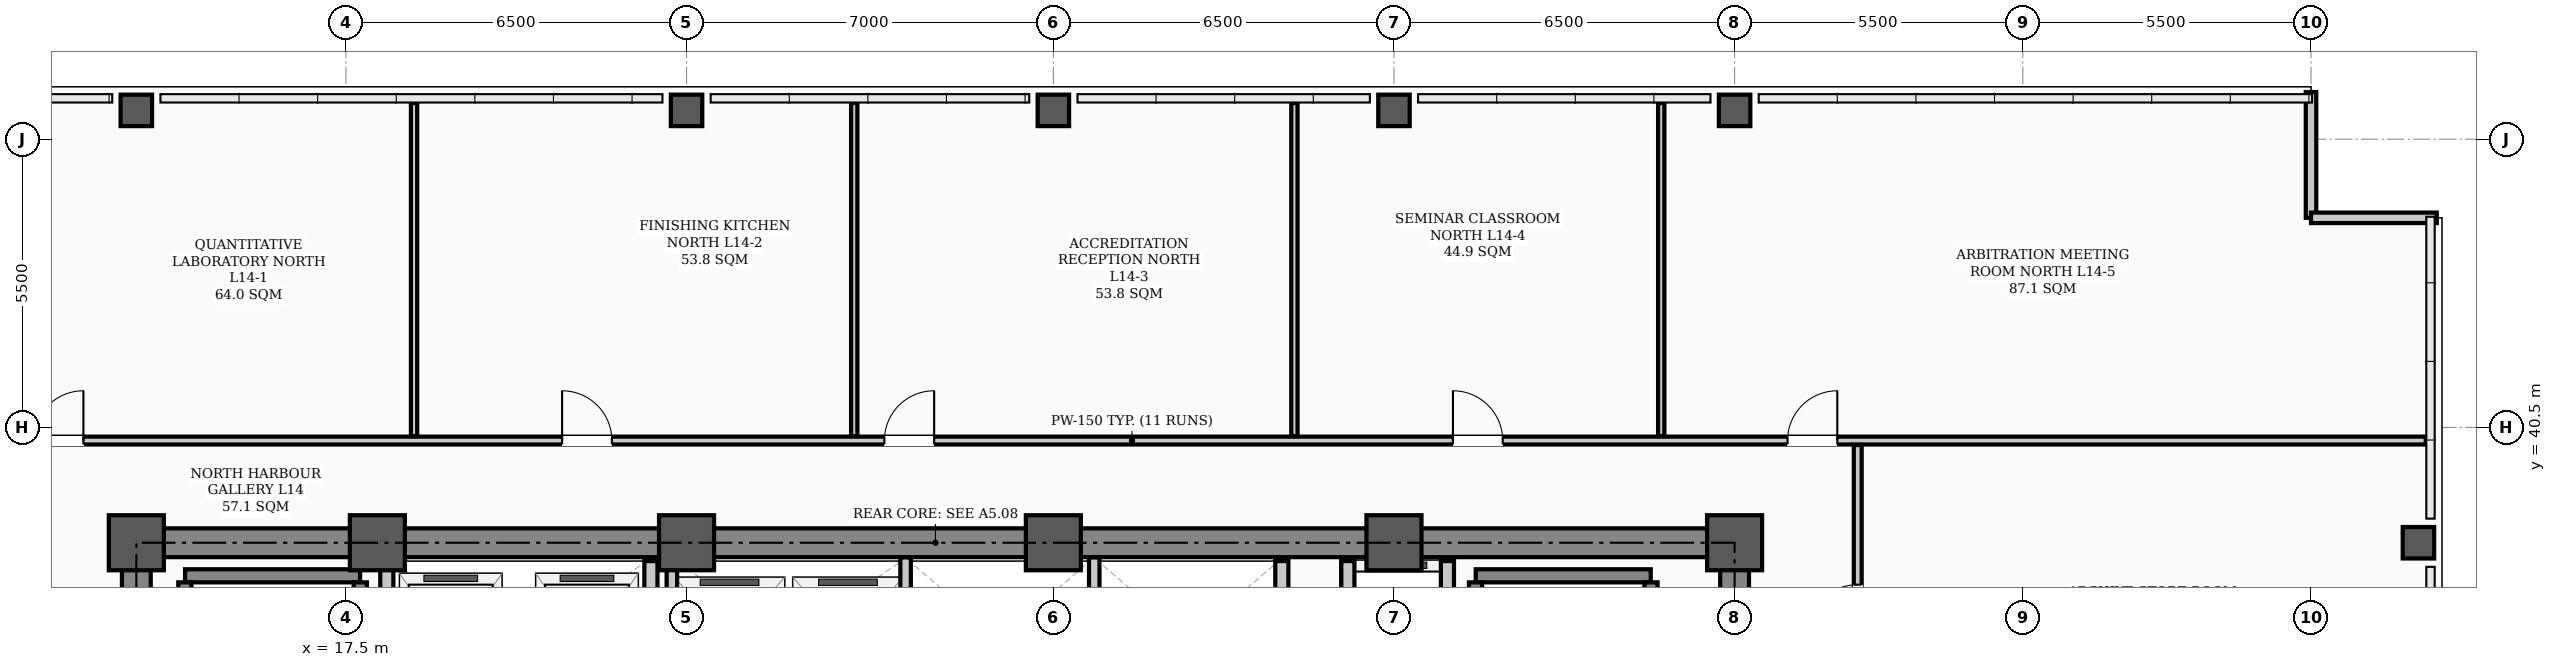
"""IFC4 building model, lengths in metres.
Left out: names, types, materials, properties, quantities, classifications, styles, units other than length and angle.
Written with IfcOpenShell. Run it as: python <this file> out.ifc"""

import sys

from ifc_helpers import new_model, si_unit, direction, frame, frame_2d, origin, origin_2d, place, context, subcontext, project, spatial, rectangle, hollow_rectangle, extrude, element, fill, save


model = new_model("IFC4")
c1 = context("Model", 3, precision=1e-05, world=origin(), true_north=direction((0.0, 1.0)))
c2 = subcontext(c1, "Body", "Model", "MODEL_VIEW")
j1 = project(units=[si_unit("LENGTHUNIT", "METRE"), si_unit("PLANEANGLEUNIT", "RADIAN")], contexts=[c1])
p1 = place(None, origin())
s1 = spatial("IfcSite", under=j1, at=p1, CompositionType="ELEMENT")
p2 = place(p1, origin())
s2 = spatial("IfcBuilding", under=s1, at=p2, CompositionType="ELEMENT")
p3 = place(p2, frame((0.0, 0.0, 57.7)))
s3 = spatial("IfcBuildingStorey", under=s2, at=p3, CompositionType="ELEMENT", Elevation=57.7)
for number, where, z_axis, x_axis in (
    (1, (13.5, 38.3, 0.0), (0.0, 0.0, 1.0), (1.0, 0.0, 0.0)),
    (2, (18.1, 38.3, 0.0), (0.0, 0.0, 1.0), (1.0, 0.0, 0.0)),
    (3, (24.0, 38.3, 0.0), (0.0, 0.0, 1.0), (1.0, 0.0, 0.0)),
    (4, (31.0, 38.3, 0.0), (0.0, 0.0, 1.0), (1.0, 0.0, 0.0)),
    (5, (37.5, 38.3, 0.0), (0.0, 0.0, 1.0), (1.0, 0.0, 0.0)),
    (6, (44.0, 38.3, 0.0), (0.0, 0.0, 1.0), (1.0, 0.0, 0.0)),
):
    element("IfcColumn", number, at=place(p3, frame(where, z_axis=z_axis, x_axis=x_axis)), inside=s3, PredefinedType="COLUMN", context=c2, shape_type="SweptSolid", body=[
        extrude(hollow_rectangle(XDim=1.05, YDim=1.05, WallThickness=0.038, InnerFilletRadius=0.019, OuterFilletRadius=0.057, at=origin_2d()), origin(), (0.0, 0.0, 1.0), 3.9),
    ])
for number, where, z_axis, x_axis in (
    (7, (13.5, 46.55, 0.0), (0.0, 0.0, 1.0), (1.0, 0.0, 0.0)),
    (8, (24.0, 46.55, 0.0), (0.0, 0.0, 1.0), (1.0, 0.0, 0.0)),
    (9, (31.0, 46.55, 0.0), (0.0, 0.0, 1.0), (1.0, 0.0, 0.0)),
    (10, (37.5, 46.55, 0.0), (0.0, 0.0, 1.0), (1.0, 0.0, 0.0)),
    (11, (44.0, 46.55, 0.0), (0.0, 0.0, 1.0), (1.0, 0.0, 0.0)),
    (12, (57.05, 38.3, 0.0), (0.0, 0.0, 1.0), (1.0, 0.0, 0.0)),
):
    element("IfcColumn", number, at=place(p3, frame(where, z_axis=z_axis, x_axis=x_axis)), inside=s3, PredefinedType="COLUMN", context=c2, shape_type="SweptSolid", body=[
        extrude(hollow_rectangle(XDim=0.6, YDim=0.6, WallThickness=0.026, InnerFilletRadius=0.013, OuterFilletRadius=0.039, at=origin_2d()), origin(), (0.0, 0.0, 1.0), 3.9),
    ])
for number, where, z_axis, x_axis in (
    (13, (55.0, 46.9, 0.0), (0.0, 0.0, 1.0), (0.0, -1.0, 0.0)),
    (14, (55.0, 44.5, 0.0), (0.0, 0.0, 1.0), (1.0, 0.0, 0.0)),
):
    element("IfcWall", number, at=place(p3, frame(where, z_axis=z_axis, x_axis=x_axis)), inside=s3, PredefinedType="PARAPET", context=c2, shape_type="SweptSolid", body=[
        extrude(rectangle(XDim=2.4, YDim=0.2, at=frame_2d((1.2, 0.0))), origin(), (0.0, 0.0, 1.0), 1.2),
    ])
p4 = place(p3, frame((13.5, 38.3, 0.0), z_axis=(0.0, 0.0, 1.0), x_axis=(1.0, 0.0, 0.0)))
e15 = element("IfcWall", 15, at=p4, inside=s3, PredefinedType="SHEAR", context=c2, shape_type="SweptSolid", body=[
    extrude(rectangle(XDim=30.5, YDim=0.55, at=frame_2d((15.25, 0.0))), origin(), (0.0, 0.0, 1.0), 3.72),
])
for number, where, z_axis, x_axis in (
    (16, (13.5, 29.35, 0.0), (0.0, 0.0, 1.0), (0.0, 1.0, 0.0)),
    (17, (44.0, 29.35, 0.0), (0.0, 0.0, 1.0), (0.0, 1.0, 0.0)),
):
    element("IfcWall", number, at=place(p3, frame(where, z_axis=z_axis, x_axis=x_axis)), inside=s3, PredefinedType="SHEAR", context=c2, shape_type="SweptSolid", body=[
        extrude(rectangle(XDim=8.6, YDim=0.55, at=frame_2d((4.3, 0.0))), origin(), (0.0, 0.0, 1.0), 3.72),
    ])
p5 = place(p3, frame((14.43, 37.669, 0.0), z_axis=(0.0, 0.0, 1.0), x_axis=(1.0, 0.0, 0.0)))
e18 = element("IfcWall", 18, at=p5, inside=s3, PredefinedType="STANDARD", context=c2, shape_type="SweptSolid", body=[
    extrude(rectangle(XDim=3.34, YDim=0.25, at=frame_2d((1.67, 0.0))), origin(), (0.0, 0.0, 1.0), 3.72),
])
for number, where, z_axis, x_axis in (
    (19, (14.425, 30.36, 0.0), (0.0, 0.0, 1.0), (0.0, 1.0, 0.0)),
    (20, (17.775, 30.36, 0.0), (0.0, 0.0, 1.0), (0.0, 1.0, 0.0)),
):
    element("IfcWall", number, at=place(p3, frame(where, z_axis=z_axis, x_axis=x_axis)), inside=s3, PredefinedType="STANDARD", context=c2, shape_type="SweptSolid", body=[
        extrude(rectangle(XDim=7.184, YDim=0.25, at=frame_2d((3.592, 0.0))), origin(), (0.0, 0.0, 1.0), 3.72),
    ])
p6 = place(p3, frame((39.06, 37.669, 0.0), z_axis=(0.0, 0.0, 1.0), x_axis=(1.0, 0.0, 0.0)))
e21 = element("IfcWall", 21, at=p6, inside=s3, PredefinedType="STANDARD", context=c2, shape_type="SweptSolid", body=[
    extrude(rectangle(XDim=3.34, YDim=0.25, at=frame_2d((1.67, 0.0))), origin(), (0.0, 0.0, 1.0), 3.72),
])
for number, where, z_axis, x_axis in (
    (22, (39.055, 30.36, 0.0), (0.0, 0.0, 1.0), (0.0, 1.0, 0.0)),
    (23, (42.405, 30.36, 0.0), (0.0, 0.0, 1.0), (0.0, 1.0, 0.0)),
):
    element("IfcWall", number, at=place(p3, frame(where, z_axis=z_axis, x_axis=x_axis)), inside=s3, PredefinedType="STANDARD", context=c2, shape_type="SweptSolid", body=[
        extrude(rectangle(XDim=7.184, YDim=0.25, at=frame_2d((3.592, 0.0))), origin(), (0.0, 0.0, 1.0), 3.72),
    ])
p7 = place(p3, frame((36.62, 31.95, 0.0), z_axis=(0.0, 0.0, 1.0), x_axis=(0.0, 1.0, 0.0)))
e24 = element("IfcWall", 24, at=p7, inside=s3, PredefinedType="STANDARD", context=c2, shape_type="SweptSolid", body=[
    extrude(rectangle(XDim=6.0, YDim=0.25, at=frame_2d((3.0, 0.0))), origin(), (0.0, 0.0, 1.0), 3.3),
])
p8 = place(p7, frame((0.9, 0.0, 0.0)))
e25 = element("IfcOpeningElement", 25, at=p8, cuts=e24, PredefinedType="OPENING", context=c2, shape_type="SweptSolid", body=[
    extrude(rectangle(XDim=1.1, YDim=2.08, at=frame_2d((0.55, 1.04))), frame((0.0, 0.135, 0.0), z_axis=(0.0, -1.0, 0.0), x_axis=(1.0, 0.0, 0.0)), (0.0, 0.0, 1.0), 0.27),
])
p9 = place(p7, frame((4.0, 0.0, 0.0)))
e26 = element("IfcOpeningElement", 26, at=p9, cuts=e24, PredefinedType="OPENING", context=c2, shape_type="SweptSolid", body=[
    extrude(rectangle(XDim=1.1, YDim=2.08, at=frame_2d((0.55, 1.04))), frame((0.0, 0.135, 0.0), z_axis=(0.0, -1.0, 0.0), x_axis=(1.0, 0.0, 0.0)), (0.0, 0.0, 1.0), 0.27),
])
p10 = place(p3, frame((38.52, 31.95, 0.0), z_axis=(0.0, 0.0, 1.0), x_axis=(0.0, 1.0, 0.0)))
e27 = element("IfcWall", 27, at=p10, inside=s3, PredefinedType="STANDARD", context=c2, shape_type="SweptSolid", body=[
    extrude(rectangle(XDim=6.0, YDim=0.25, at=frame_2d((3.0, 0.0))), origin(), (0.0, 0.0, 1.0), 3.3),
])
for number, where, z_axis, x_axis in (
    (28, (18.28, 34.62, 0.0), (0.0, 0.0, 1.0), (0.0, 1.0, 0.0)),
    (29, (23.32, 34.62, 0.0), (0.0, 0.0, 1.0), (0.0, 1.0, 0.0)),
):
    element("IfcWall", number, at=place(p3, frame(where, z_axis=z_axis, x_axis=x_axis)), inside=s3, PredefinedType="STANDARD", context=c2, shape_type="SweptSolid", body=[
        extrude(rectangle(XDim=3.33, YDim=0.25, at=frame_2d((1.665, 0.0))), origin(), (0.0, 0.0, 1.0), 3.3),
    ])
p11 = place(p3, frame((35.36, 34.9, 0.0), z_axis=(0.0, 0.0, 1.0), x_axis=(0.0, 1.0, 0.0)))
e30 = element("IfcWall", 30, at=p11, inside=s3, PredefinedType="STANDARD", context=c2, shape_type="SweptSolid", body=[
    extrude(rectangle(XDim=3.05, YDim=0.25, at=frame_2d((1.525, 0.0))), origin(), (0.0, 0.0, 1.0), 3.3),
])
p12 = place(p3, frame((7.81, 40.25, 0.0), z_axis=(0.0, 0.0, 1.0), x_axis=(1.0, 0.0, 0.0)))
e31 = element("IfcWall", 31, at=p12, inside=s3, PredefinedType="PARTITIONING", context=c2, shape_type="SweptSolid", body=[
    extrude(rectangle(XDim=49.38, YDim=0.15, at=frame_2d((24.69, 0.0))), origin(), (0.0, 0.0, 1.0), 3.1),
])
p13 = place(p12, frame((3.73, 0.0, 0.0)))
e32 = element("IfcOpeningElement", 32, at=p13, cuts=e31, PredefinedType="OPENING", context=c2, shape_type="SweptSolid", body=[
    extrude(rectangle(XDim=0.95, YDim=2.08, at=frame_2d((0.475, 1.04))), frame((0.0, 0.085, 0.0), z_axis=(0.0, -1.0, 0.0), x_axis=(1.0, 0.0, 0.0)), (0.0, 0.0, 1.0), 0.17),
])
p14 = place(p12, frame((13.815, 0.0, 0.0)))
e33 = element("IfcOpeningElement", 33, at=p14, cuts=e31, PredefinedType="OPENING", context=c2, shape_type="SweptSolid", body=[
    extrude(rectangle(XDim=0.95, YDim=2.08, at=frame_2d((0.475, 1.04))), frame((0.0, 0.085, 0.0), z_axis=(0.0, -1.0, 0.0), x_axis=(1.0, 0.0, 0.0)), (0.0, 0.0, 1.0), 0.17),
])
p15 = place(p12, frame((19.965, 0.0, 0.0)))
e34 = element("IfcOpeningElement", 34, at=p15, cuts=e31, PredefinedType="OPENING", context=c2, shape_type="SweptSolid", body=[
    extrude(rectangle(XDim=0.95, YDim=2.08, at=frame_2d((0.475, 1.04))), frame((0.0, 0.085, 0.0), z_axis=(0.0, -1.0, 0.0), x_axis=(1.0, 0.0, 0.0)), (0.0, 0.0, 1.0), 0.17),
])
p16 = place(p12, frame((30.815, 0.0, 0.0)))
e35 = element("IfcOpeningElement", 35, at=p16, cuts=e31, PredefinedType="OPENING", context=c2, shape_type="SweptSolid", body=[
    extrude(rectangle(XDim=0.95, YDim=2.08, at=frame_2d((0.475, 1.04))), frame((0.0, 0.085, 0.0), z_axis=(0.0, -1.0, 0.0), x_axis=(1.0, 0.0, 0.0)), (0.0, 0.0, 1.0), 0.17),
])
p17 = place(p12, frame((37.2, 0.0, 0.0)))
e36 = element("IfcOpeningElement", 36, at=p17, cuts=e31, PredefinedType="OPENING", context=c2, shape_type="SweptSolid", body=[
    extrude(rectangle(XDim=0.95, YDim=2.08, at=frame_2d((0.475, 1.04))), frame((0.0, 0.085, 0.0), z_axis=(0.0, -1.0, 0.0), x_axis=(1.0, 0.0, 0.0)), (0.0, 0.0, 1.0), 0.17),
])
p18 = place(p3, frame((46.35, 17.635, 0.0), z_axis=(0.0, 0.0, 1.0), x_axis=(0.0, 1.0, 0.0)))
e37 = element("IfcWall", 37, at=p18, inside=s3, PredefinedType="PARTITIONING", context=c2, shape_type="SweptSolid", body=[
    extrude(rectangle(XDim=22.53, YDim=0.15, at=frame_2d((11.265, 0.0))), origin(), (0.0, 0.0, 1.0), 3.0),
])
p19 = place(p18, frame((4.265, 0.0, 0.0)))
e38 = element("IfcOpeningElement", 38, at=p19, cuts=e37, PredefinedType="OPENING", context=c2, shape_type="SweptSolid", body=[
    extrude(rectangle(XDim=0.95, YDim=2.08, at=frame_2d((0.475, 1.04))), frame((0.0, 0.085, 0.0), z_axis=(0.0, -1.0, 0.0), x_axis=(1.0, 0.0, 0.0)), (0.0, 0.0, 1.0), 0.17),
])
p20 = place(p18, frame((12.39, 0.0, 0.0)))
e39 = element("IfcOpeningElement", 39, at=p20, cuts=e37, PredefinedType="OPENING", context=c2, shape_type="SweptSolid", body=[
    extrude(rectangle(XDim=0.95, YDim=2.08, at=frame_2d((0.475, 1.04))), frame((0.0, 0.085, 0.0), z_axis=(0.0, -1.0, 0.0), x_axis=(1.0, 0.0, 0.0)), (0.0, 0.0, 1.0), 0.17),
])
p21 = place(p18, frame((18.915, 0.0, 0.0)))
e40 = element("IfcOpeningElement", 40, at=p21, cuts=e37, PredefinedType="OPENING", context=c2, shape_type="SweptSolid", body=[
    extrude(rectangle(XDim=0.95, YDim=2.08, at=frame_2d((0.475, 1.04))), frame((0.0, 0.085, 0.0), z_axis=(0.0, -1.0, 0.0), x_axis=(1.0, 0.0, 0.0)), (0.0, 0.0, 1.0), 0.17),
])
for number, where, z_axis, x_axis in (
    (41, (18.8, 40.335, 0.0), (0.0, 0.0, 1.0), (0.0, 1.0, 0.0)),
    (42, (27.2, 40.335, 0.0), (0.0, 0.0, 1.0), (0.0, 1.0, 0.0)),
    (43, (35.6, 40.335, 0.0), (0.0, 0.0, 1.0), (0.0, 1.0, 0.0)),
    (44, (42.6, 40.335, 0.0), (0.0, 0.0, 1.0), (0.0, 1.0, 0.0)),
):
    element("IfcWall", number, at=place(p3, frame(where, z_axis=z_axis, x_axis=x_axis)), inside=s3, PredefinedType="PARTITIONING", context=c2, shape_type="SweptSolid", body=[
        extrude(rectangle(XDim=6.355, YDim=0.12, at=frame_2d((3.177, 0.0))), origin(), (0.0, 0.0, 1.0), 3.212),
    ])
p22 = place(p3, frame((23.72, 34.9, 0.0), z_axis=(0.0, 0.0, 1.0), x_axis=(0.0, 1.0, 0.0)))
e45 = element("IfcWall", 45, at=p22, inside=s3, PredefinedType="STANDARD", context=c2, shape_type="SweptSolid", body=[
    extrude(rectangle(XDim=3.12, YDim=0.2, at=frame_2d((1.56, 0.0))), origin(), (0.0, 0.0, 1.0), 3.1),
])
for number, where, z_axis, x_axis in (
    (46, (28.18, 34.9, 0.0), (0.0, 0.0, 1.0), (0.0, 1.0, 0.0)),
    (47, (31.78, 34.9, 0.0), (0.0, 0.0, 1.0), (0.0, 1.0, 0.0)),
):
    element("IfcWall", number, at=place(p3, frame(where, z_axis=z_axis, x_axis=x_axis)), inside=s3, PredefinedType="STANDARD", context=c2, shape_type="SweptSolid", body=[
        extrude(rectangle(XDim=3.12, YDim=0.2, at=frame_2d((1.56, 0.0))), origin(), (0.0, 0.0, 1.0), 3.3),
    ])
p23 = place(p21, origin())
e48 = element("IfcDoor", 48, at=p23, inside=s3, OperationType="SINGLE_SWING_LEFT", PredefinedType="DOOR", context=c2, shape_type="SweptSolid", body=[
    extrude(rectangle(XDim=0.95, YDim=2.08, at=frame_2d((0.475, 1.04))), frame((0.0, 0.025, 0.0), z_axis=(0.0, -1.0, 0.0), x_axis=(1.0, 0.0, 0.0)), (0.0, 0.0, 1.0), 0.05),
])
fill(e40, e48)
p24 = place(p13, origin())
e49 = element("IfcDoor", 49, at=p24, inside=s3, OperationType="SINGLE_SWING_RIGHT", PredefinedType="DOOR", context=c2, shape_type="SweptSolid", body=[
    extrude(rectangle(XDim=0.95, YDim=2.08, at=frame_2d((0.475, 1.04))), frame((0.0, 0.025, 0.0), z_axis=(0.0, -1.0, 0.0), x_axis=(1.0, 0.0, 0.0)), (0.0, 0.0, 1.0), 0.05),
])
fill(e32, e49)
p25 = place(p14, origin())
e50 = element("IfcDoor", 50, at=p25, inside=s3, OperationType="SINGLE_SWING_LEFT", PredefinedType="DOOR", context=c2, shape_type="SweptSolid", body=[
    extrude(rectangle(XDim=0.95, YDim=2.08, at=frame_2d((0.475, 1.04))), frame((0.0, 0.025, 0.0), z_axis=(0.0, -1.0, 0.0), x_axis=(1.0, 0.0, 0.0)), (0.0, 0.0, 1.0), 0.05),
])
fill(e33, e50)
p26 = place(p15, origin())
e51 = element("IfcDoor", 51, at=p26, inside=s3, OperationType="SINGLE_SWING_RIGHT", PredefinedType="DOOR", context=c2, shape_type="SweptSolid", body=[
    extrude(rectangle(XDim=0.95, YDim=2.08, at=frame_2d((0.475, 1.04))), frame((0.0, 0.025, 0.0), z_axis=(0.0, -1.0, 0.0), x_axis=(1.0, 0.0, 0.0)), (0.0, 0.0, 1.0), 0.05),
])
fill(e34, e51)
p27 = place(p16, origin())
e52 = element("IfcDoor", 52, at=p27, inside=s3, OperationType="SINGLE_SWING_LEFT", PredefinedType="DOOR", context=c2, shape_type="SweptSolid", body=[
    extrude(rectangle(XDim=0.95, YDim=2.08, at=frame_2d((0.475, 1.04))), frame((0.0, 0.025, 0.0), z_axis=(0.0, -1.0, 0.0), x_axis=(1.0, 0.0, 0.0)), (0.0, 0.0, 1.0), 0.05),
])
fill(e35, e52)
p28 = place(p17, origin())
e53 = element("IfcDoor", 53, at=p28, inside=s3, OperationType="SINGLE_SWING_RIGHT", PredefinedType="DOOR", context=c2, shape_type="SweptSolid", body=[
    extrude(rectangle(XDim=0.95, YDim=2.08, at=frame_2d((0.475, 1.04))), frame((0.0, 0.025, 0.0), z_axis=(0.0, -1.0, 0.0), x_axis=(1.0, 0.0, 0.0)), (0.0, 0.0, 1.0), 0.05),
])
fill(e36, e53)
save(model, sys.argv[1])
